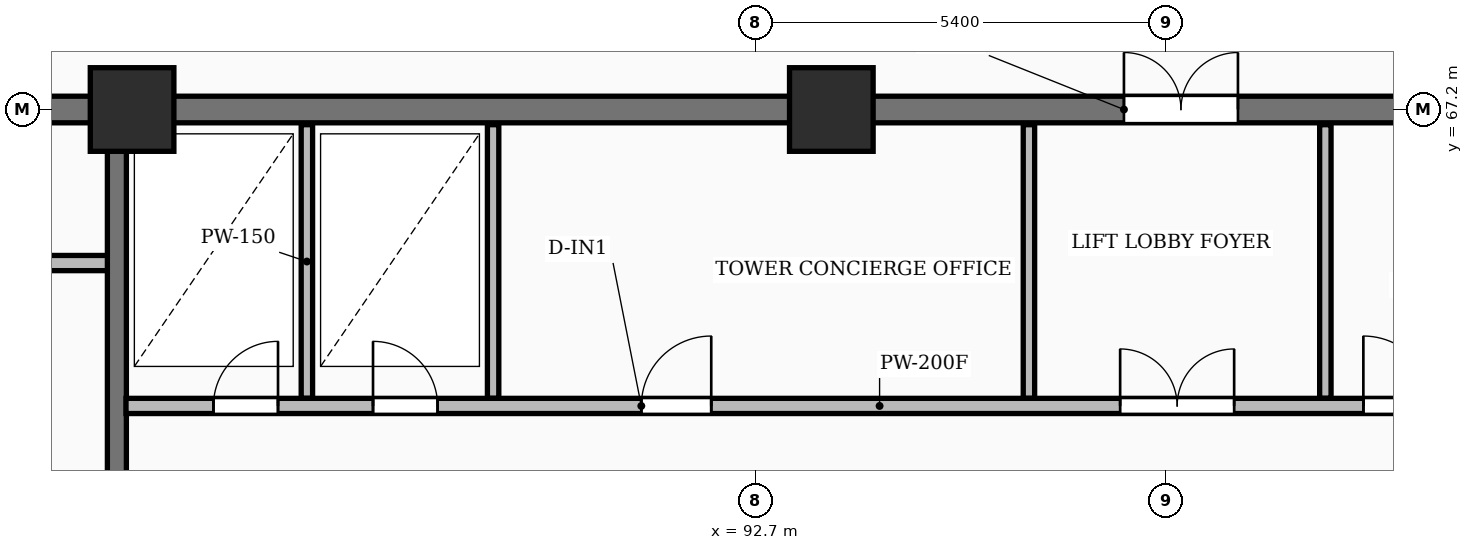
"""IFC4 building model, lengths in metres.
Left out: names, types, materials, properties, quantities, classifications, styles, units other than length and angle.
Written with IfcOpenShell. Run it as: python <this file> out.ifc"""

import sys

from ifc_helpers import new_model, si_unit, direction, frame, frame_2d, origin, origin_2d, place, context, subcontext, project, spatial, rectangle, extrude, element, fill, save


model = new_model("IFC4")
c1 = context("Model", 3, precision=1e-05, world=origin(), true_north=direction((0.0, 1.0)))
c2 = subcontext(c1, "Body", "Model", "MODEL_VIEW")
j1 = project(units=[si_unit("LENGTHUNIT", "METRE"), si_unit("PLANEANGLEUNIT", "RADIAN")], contexts=[c1])
p1 = place(None, origin())
s1 = spatial("IfcSite", under=j1, at=p1, CompositionType="ELEMENT")
p2 = place(p1, origin())
s2 = spatial("IfcBuilding", under=s1, at=p2, CompositionType="ELEMENT")
p3 = place(p2, origin())
s3 = spatial("IfcBuildingStorey", under=s2, at=p3, CompositionType="ELEMENT", Elevation=0.0)
for number, where, z_axis, x_axis in (
    (1, (84.5, 67.2, 0.0), (0.0, 0.0, 1.0), (1.0, 0.0, 0.0)),
    (2, (93.7, 67.2, 0.0), (0.0, 0.0, 1.0), (1.0, 0.0, 0.0)),
):
    element("IfcColumn", number, at=place(p3, frame(where, z_axis=z_axis, x_axis=x_axis)), inside=s3, PredefinedType="COLUMN", context=c2, shape_type="SweptSolid", body=[
        extrude(rectangle(XDim=1.1, YDim=1.1, at=origin_2d()), origin(), (0.0, 0.0, 1.0), 5.4),
    ])
p4 = place(p3, frame((75.95, 67.2, 0.0), z_axis=(0.0, 0.0, 1.0), x_axis=(1.0, 0.0, 0.0)))
e3 = element("IfcWall", 3, at=p4, inside=s3, PredefinedType="SHEAR", context=c2, shape_type="SweptSolid", body=[
    extrude(rectangle(XDim=36.3, YDim=0.35, at=frame_2d((18.15, 0.0))), origin(), (0.0, 0.0, 1.0), 5.4),
])
p5 = place(p4, frame((5.25, 0.0, 0.0)))
e4 = element("IfcOpeningElement", 4, at=p5, cuts=e3, PredefinedType="OPENING", context=c2, shape_type="SweptSolid", body=[
    extrude(rectangle(XDim=1.0, YDim=2.15, at=frame_2d((0.5, 1.075))), frame((0.0, 0.185, 0.0), z_axis=(0.0, -1.0, 0.0), x_axis=(1.0, 0.0, 0.0)), (0.0, 0.0, 1.0), 0.37),
])
p6 = place(p4, frame((21.6, 0.0, 0.0)))
e5 = element("IfcOpeningElement", 5, at=p6, cuts=e3, PredefinedType="OPENING", context=c2, shape_type="SweptSolid", body=[
    extrude(rectangle(XDim=1.5, YDim=2.2, at=frame_2d((0.75, 1.1))), frame((0.0, 0.185, 0.0), z_axis=(0.0, -1.0, 0.0), x_axis=(1.0, 0.0, 0.0)), (0.0, 0.0, 1.0), 0.37),
])
p7 = place(p4, frame((30.45, 0.0, 0.0)))
e6 = element("IfcOpeningElement", 6, at=p7, cuts=e3, PredefinedType="OPENING", context=c2, shape_type="SweptSolid", body=[
    extrude(rectangle(XDim=1.0, YDim=2.15, at=frame_2d((0.5, 1.075))), frame((0.0, 0.185, 0.0), z_axis=(0.0, -1.0, 0.0), x_axis=(1.0, 0.0, 0.0)), (0.0, 0.0, 1.0), 0.37),
])
p8 = place(p3, frame((79.79, 65.18, 0.0), z_axis=(0.0, 0.0, 1.0), x_axis=(1.0, 0.0, 0.0)))
e7 = element("IfcWall", 7, at=p8, inside=s3, PredefinedType="PARTITIONING", context=c2, shape_type="SweptSolid", body=[
    extrude(rectangle(XDim=4.39, YDim=0.2, at=frame_2d((2.195, 0.0))), origin(), (0.0, 0.0, 1.0), 5.1),
])
p9 = place(p8, frame((1.5, 0.0, 0.0)))
e8 = element("IfcOpeningElement", 8, at=p9, cuts=e7, PredefinedType="OPENING", context=c2, shape_type="SweptSolid", body=[
    extrude(rectangle(XDim=1.1, YDim=2.1, at=frame_2d((0.55, 1.05))), frame((0.0, 0.11, 0.0), z_axis=(0.0, -1.0, 0.0), x_axis=(1.0, 0.0, 0.0)), (0.0, 0.0, 1.0), 0.22),
])
p10 = place(p3, frame((84.3, 55.4, 0.0), z_axis=(0.0, 0.0, 1.0), x_axis=(0.0, 1.0, 0.0)))
e9 = element("IfcWall", 9, at=p10, inside=s3, PredefinedType="SHEAR", context=c2, shape_type="SweptSolid", body=[
    extrude(rectangle(XDim=11.6, YDim=0.25, at=frame_2d((5.8, 0.0))), origin(), (0.0, 0.0, 1.0), 5.4),
])
p11 = place(p10, frame((5.2, 0.0, 0.0)))
e10 = element("IfcOpeningElement", 10, at=p11, cuts=e9, PredefinedType="OPENING", context=c2, shape_type="SweptSolid", body=[
    extrude(rectangle(XDim=1.1, YDim=2.1, at=frame_2d((0.55, 1.05))), frame((0.0, 0.135, 0.0), z_axis=(0.0, -1.0, 0.0), x_axis=(1.0, 0.0, 0.0)), (0.0, 0.0, 1.0), 0.27),
])
for number, where, z_axis, x_axis in (
    (11, (86.8, 63.4, 0.0), (0.0, 0.0, 1.0), (0.0, 1.0, 0.0)),
    (12, (89.25, 63.4, 0.0), (0.0, 0.0, 1.0), (0.0, 1.0, 0.0)),
    (13, (96.3, 63.4, 0.0), (0.0, 0.0, 1.0), (0.0, 1.0, 0.0)),
    (14, (100.2, 63.4, 0.0), (0.0, 0.0, 1.0), (0.0, 1.0, 0.0)),
):
    element("IfcWall", number, at=place(p3, frame(where, z_axis=z_axis, x_axis=x_axis)), inside=s3, PredefinedType="PARTITIONING", context=c2, shape_type="SweptSolid", body=[
        extrude(rectangle(XDim=3.6, YDim=0.15, at=frame_2d((1.8, 0.0))), origin(), (0.0, 0.0, 1.0), 5.1),
    ])
p12 = place(p3, frame((84.42, 63.3, 0.0), z_axis=(0.0, 0.0, 1.0), x_axis=(1.0, 0.0, 0.0)))
e15 = element("IfcWall", 15, at=p12, inside=s3, PredefinedType="PARTITIONING", context=c2, shape_type="SweptSolid", body=[
    extrude(rectangle(XDim=19.83, YDim=0.2, at=frame_2d((9.915, 0.0))), origin(), (0.0, 0.0, 1.0), 5.1),
])
p13 = place(p12, frame((1.15, 0.0, 0.0)))
e16 = element("IfcOpeningElement", 16, at=p13, cuts=e15, PredefinedType="OPENING", context=c2, shape_type="SweptSolid", body=[
    extrude(rectangle(XDim=0.85, YDim=2.05, at=frame_2d((0.425, 1.025))), frame((0.0, 0.11, 0.0), z_axis=(0.0, -1.0, 0.0), x_axis=(1.0, 0.0, 0.0)), (0.0, 0.0, 1.0), 0.22),
])
p14 = place(p12, frame((3.25, 0.0, 0.0)))
e17 = element("IfcOpeningElement", 17, at=p14, cuts=e15, PredefinedType="OPENING", context=c2, shape_type="SweptSolid", body=[
    extrude(rectangle(XDim=0.85, YDim=2.05, at=frame_2d((0.425, 1.025))), frame((0.0, 0.11, 0.0), z_axis=(0.0, -1.0, 0.0), x_axis=(1.0, 0.0, 0.0)), (0.0, 0.0, 1.0), 0.22),
])
p15 = place(p12, frame((13.08, 0.0, 0.0)))
e18 = element("IfcOpeningElement", 18, at=p15, cuts=e15, PredefinedType="OPENING", context=c2, shape_type="SweptSolid", body=[
    extrude(rectangle(XDim=1.5, YDim=2.2, at=frame_2d((0.75, 1.1))), frame((0.0, 0.11, 0.0), z_axis=(0.0, -1.0, 0.0), x_axis=(1.0, 0.0, 0.0)), (0.0, 0.0, 1.0), 0.22),
])
p16 = place(p12, frame((6.78, 0.0, 0.0)))
e19 = element("IfcOpeningElement", 19, at=p16, cuts=e15, PredefinedType="OPENING", context=c2, shape_type="SweptSolid", body=[
    extrude(rectangle(XDim=0.92, YDim=2.08, at=frame_2d((0.46, 1.04))), frame((0.0, 0.11, 0.0), z_axis=(0.0, -1.0, 0.0), x_axis=(1.0, 0.0, 0.0)), (0.0, 0.0, 1.0), 0.22),
])
p17 = place(p12, frame((16.28, 0.0, 0.0)))
e20 = element("IfcOpeningElement", 20, at=p17, cuts=e15, PredefinedType="OPENING", context=c2, shape_type="SweptSolid", body=[
    extrude(rectangle(XDim=0.92, YDim=2.08, at=frame_2d((0.46, 1.04))), frame((0.0, 0.11, 0.0), z_axis=(0.0, -1.0, 0.0), x_axis=(1.0, 0.0, 0.0)), (0.0, 0.0, 1.0), 0.22),
])
p18 = place(p6, origin())
e21 = element("IfcDoor", 21, at=p18, inside=s3, OperationType="DOUBLE_DOOR_SINGLE_SWING", PredefinedType="DOOR", context=c2, shape_type="SweptSolid", body=[
    extrude(rectangle(XDim=1.5, YDim=2.2, at=frame_2d((0.75, 1.1))), frame((0.0, 0.025, 0.0), z_axis=(0.0, -1.0, 0.0), x_axis=(1.0, 0.0, 0.0)), (0.0, 0.0, 1.0), 0.05),
])
fill(e5, e21)
p19 = place(p13, origin())
e22 = element("IfcDoor", 22, at=p19, inside=s3, OperationType="SINGLE_SWING_RIGHT", PredefinedType="DOOR", context=c2, shape_type="SweptSolid", body=[
    extrude(rectangle(XDim=0.85, YDim=2.05, at=frame_2d((0.425, 1.025))), frame((0.0, 0.025, 0.0), z_axis=(0.0, -1.0, 0.0), x_axis=(1.0, 0.0, 0.0)), (0.0, 0.0, 1.0), 0.05),
])
fill(e16, e22)
p20 = place(p14, origin())
e23 = element("IfcDoor", 23, at=p20, inside=s3, OperationType="SINGLE_SWING_LEFT", PredefinedType="DOOR", context=c2, shape_type="SweptSolid", body=[
    extrude(rectangle(XDim=0.85, YDim=2.05, at=frame_2d((0.425, 1.025))), frame((0.0, 0.025, 0.0), z_axis=(0.0, -1.0, 0.0), x_axis=(1.0, 0.0, 0.0)), (0.0, 0.0, 1.0), 0.05),
])
fill(e17, e23)
p21 = place(p15, origin())
e24 = element("IfcDoor", 24, at=p21, inside=s3, OperationType="DOUBLE_DOOR_SINGLE_SWING", PredefinedType="DOOR", context=c2, shape_type="SweptSolid", body=[
    extrude(rectangle(XDim=1.5, YDim=2.2, at=frame_2d((0.75, 1.1))), frame((0.0, 0.025, 0.0), z_axis=(0.0, -1.0, 0.0), x_axis=(1.0, 0.0, 0.0)), (0.0, 0.0, 1.0), 0.05),
])
fill(e18, e24)
p22 = place(p16, origin())
e25 = element("IfcDoor", 25, at=p22, inside=s3, OperationType="SINGLE_SWING_RIGHT", PredefinedType="DOOR", context=c2, shape_type="SweptSolid", body=[
    extrude(rectangle(XDim=0.92, YDim=2.08, at=frame_2d((0.46, 1.04))), frame((0.0, 0.025, 0.0), z_axis=(0.0, -1.0, 0.0), x_axis=(1.0, 0.0, 0.0)), (0.0, 0.0, 1.0), 0.05),
])
fill(e19, e25)
p23 = place(p17, origin())
e26 = element("IfcDoor", 26, at=p23, inside=s3, OperationType="SINGLE_SWING_LEFT", PredefinedType="DOOR", context=c2, shape_type="SweptSolid", body=[
    extrude(rectangle(XDim=0.92, YDim=2.08, at=frame_2d((0.46, 1.04))), frame((0.0, 0.025, 0.0), z_axis=(0.0, -1.0, 0.0), x_axis=(1.0, 0.0, 0.0)), (0.0, 0.0, 1.0), 0.05),
])
fill(e20, e26)
save(model, sys.argv[1])
